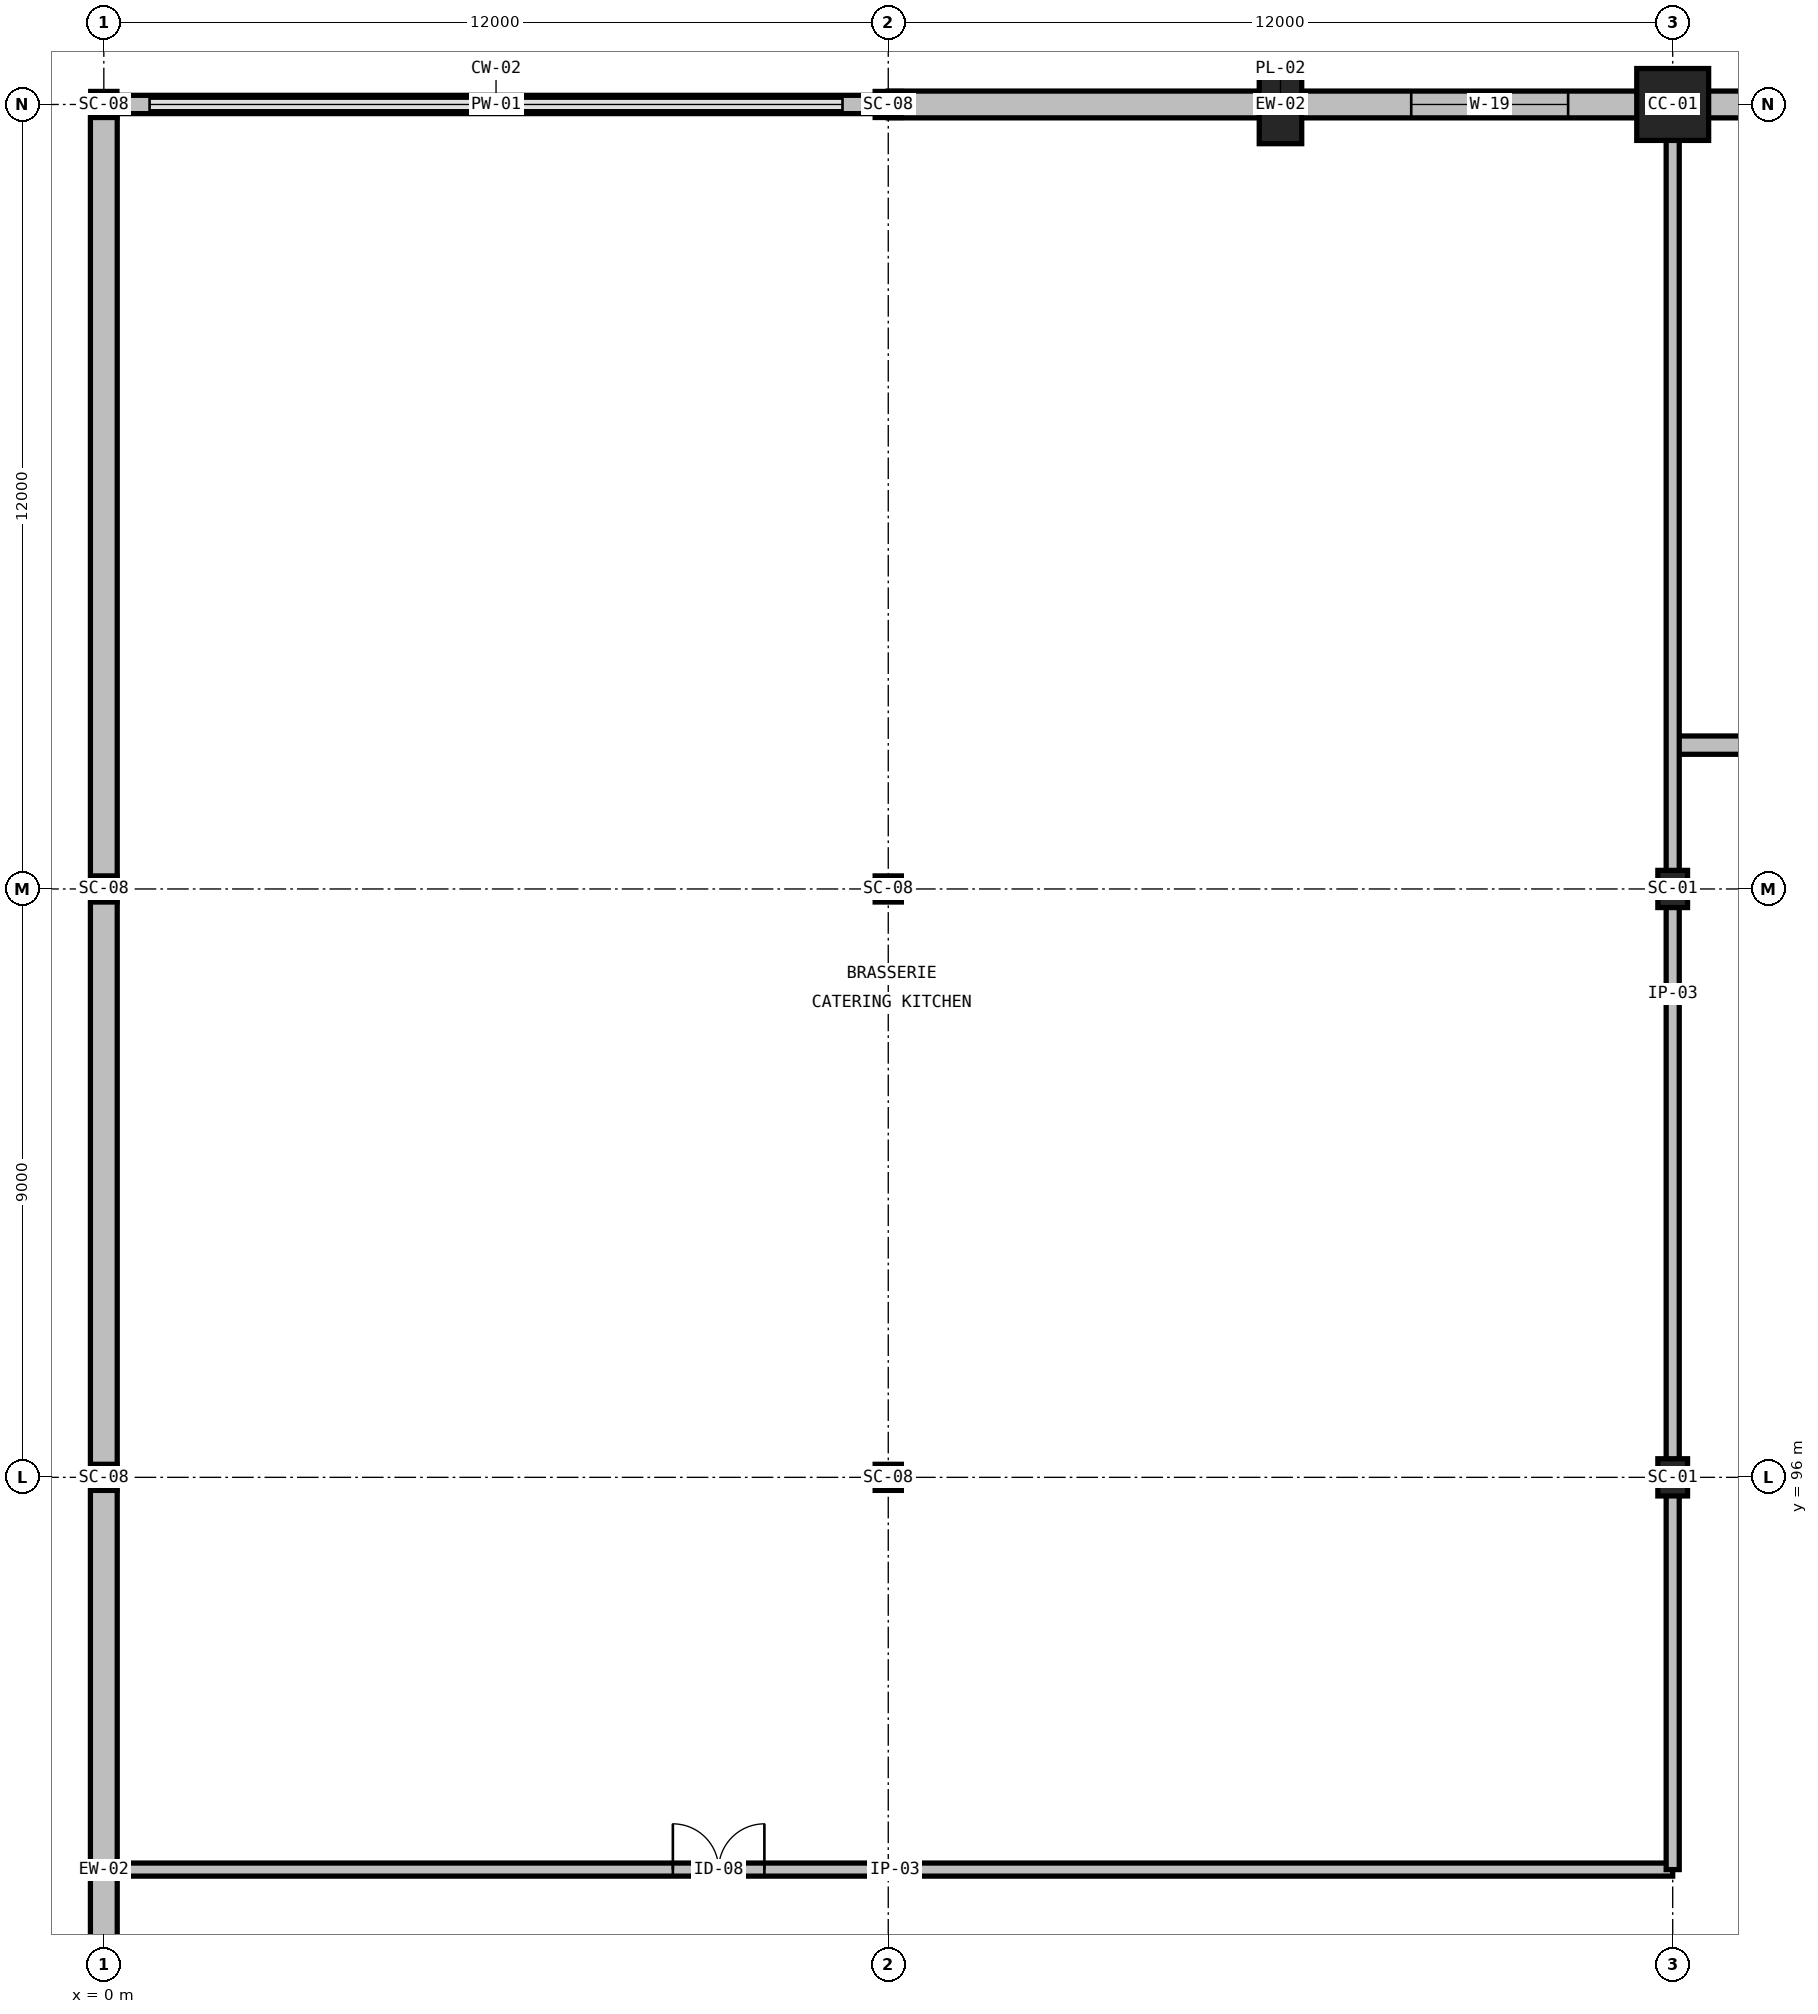
"""IFC4 building model, lengths in metres.
Left out: names, types, materials, properties, quantities, classifications, styles, units other than length and angle.
Written with IfcOpenShell. Run it as: python <this file> out.ifc"""

import sys

from ifc_helpers import new_model, si_unit, direction, frame, frame_2d, origin, origin_2d, place, context, subcontext, project, spatial, rectangle, i_section, extrude, element, fill, save


model = new_model("IFC4")
c1 = context("Model", 3, precision=1e-05, world=origin(), true_north=direction((0.0, 1.0)))
c2 = subcontext(c1, "Body", "Model", "MODEL_VIEW")
j1 = project(units=[si_unit("LENGTHUNIT", "METRE"), si_unit("PLANEANGLEUNIT", "RADIAN")], contexts=[c1])
p1 = place(None, origin())
s1 = spatial("IfcSite", under=j1, at=p1, CompositionType="ELEMENT")
p2 = place(p1, origin())
s2 = spatial("IfcBuilding", under=s1, at=p2, CompositionType="ELEMENT")
p3 = place(p2, frame((0.0, 0.0, 6.0)))
s3 = spatial("IfcBuildingStorey", under=s2, at=p3, CompositionType="ELEMENT", Elevation=6.0)
for number, where, z_axis, x_axis in (
    (1, (0.0, 96.0, 0.0), (0.0, 0.0, 1.0), (1.0, 0.0, 0.0)),
    (2, (0.0, 105.0, 0.0), (0.0, 0.0, 1.0), (1.0, 0.0, 0.0)),
    (3, (0.0, 117.0, 0.0), (0.0, 0.0, 1.0), (1.0, 0.0, 0.0)),
    (4, (12.0, 96.0, 0.0), (0.0, 0.0, 1.0), (1.0, 0.0, 0.0)),
    (5, (12.0, 105.0, 0.0), (0.0, 0.0, 1.0), (1.0, 0.0, 0.0)),
    (6, (12.0, 117.0, 0.0), (0.0, 0.0, 1.0), (1.0, 0.0, 0.0)),
):
    element("IfcColumn", number, at=place(p3, frame(where, z_axis=z_axis, x_axis=x_axis)), inside=s3, PredefinedType="COLUMN", context=c2, shape_type="SweptSolid", body=[
        extrude(i_section(OverallWidth=0.401, OverallDepth=0.399, WebThickness=0.025, FlangeThickness=0.04, FilletRadius=0.031, at=origin_2d()), origin(), (0.0, 0.0, 1.0), 6.0),
    ])
for number, where, z_axis, x_axis in (
    (7, (24.0, 96.0, 0.0), (0.0, 0.0, 1.0), (1.0, 0.0, 0.0)),
    (8, (24.0, 105.0, 0.0), (0.0, 0.0, 1.0), (1.0, 0.0, 0.0)),
):
    element("IfcColumn", number, at=place(p3, frame(where, z_axis=z_axis, x_axis=x_axis)), inside=s3, PredefinedType="COLUMN", context=c2, shape_type="SweptSolid", body=[
        extrude(i_section(OverallWidth=0.454, OverallDepth=0.569, WebThickness=0.078, FlangeThickness=0.125, FilletRadius=0.031, at=origin_2d()), origin(), (0.0, 0.0, 1.0), 6.0),
    ])
p4 = place(p3, frame((24.0, 117.0, 0.0), z_axis=(0.0, 0.0, 1.0), x_axis=(1.0, 0.0, 0.0)))
e9 = element("IfcColumn", 9, at=p4, inside=s3, PredefinedType="COLUMN", context=c2, shape_type="SweptSolid", body=[
    extrude(rectangle(XDim=1.1, YDim=1.1, at=origin_2d()), origin(), (0.0, 0.0, 1.0), 6.0),
])
p5 = place(p3, frame((18.0, 117.0, 0.0), z_axis=(0.0, 0.0, 1.0), x_axis=(1.0, 0.0, 0.0)))
e10 = element("IfcColumn", 10, at=p5, inside=s3, PredefinedType="PILASTER", context=c2, shape_type="SweptSolid", body=[
    extrude(rectangle(XDim=0.65, YDim=1.2, at=origin_2d()), origin(), (0.0, 0.0, 1.0), 6.0),
])
p6 = place(p3, frame((12.0, 117.0, 0.0), z_axis=(0.0, 0.0, 1.0), x_axis=(-1.0, 0.0, 0.0)))
e11 = element("IfcWall", 11, at=p6, inside=s3, PredefinedType="PARAPET", context=c2, shape_type="SweptSolid", body=[
    extrude(rectangle(XDim=12.0, YDim=0.28, at=frame_2d((6.0, 0.0))), origin(), (0.0, 0.0, 1.0), 0.2),
])
p7 = place(p3, frame((24.0, 117.0, 0.0), z_axis=(0.0, 0.0, 1.0), x_axis=(-1.0, 0.0, 0.0)))
e12 = element("IfcWall", 12, at=p7, inside=s3, PredefinedType="STANDARD", context=c2, shape_type="SweptSolid", body=[
    extrude(rectangle(XDim=12.0, YDim=0.41, at=frame_2d((6.0, 0.0))), origin(), (0.0, 0.0, 1.0), 4.676),
])
p8 = place(p7, frame((1.6, 0.0, 0.9)))
e13 = element("IfcOpeningElement", 13, at=p8, cuts=e12, PredefinedType="OPENING", context=c2, shape_type="SweptSolid", body=[
    extrude(rectangle(XDim=2.4, YDim=2.15, at=frame_2d((1.2, 1.075))), frame((0.0, 0.22, 0.0), z_axis=(0.0, -1.0, 0.0), x_axis=(1.0, 0.0, 0.0)), (0.0, 0.0, 1.0), 0.44),
])
p9 = place(p3, frame((30.0, 117.0, 0.0), z_axis=(0.0, 0.0, 1.0), x_axis=(-1.0, 0.0, 0.0)))
e14 = element("IfcWall", 14, at=p9, inside=s3, PredefinedType="STANDARD", context=c2, shape_type="SweptSolid", body=[
    extrude(rectangle(XDim=6.0, YDim=0.41, at=frame_2d((3.0, 0.0))), origin(), (0.0, 0.0, 1.0), 4.676),
])
p10 = place(p3, frame((0.0, 96.0, 0.0), z_axis=(0.0, 0.0, 1.0), x_axis=(0.0, -1.0, 0.0)))
e15 = element("IfcWall", 15, at=p10, inside=s3, PredefinedType="STANDARD", context=c2, shape_type="SweptSolid", body=[
    extrude(rectangle(XDim=12.0, YDim=0.41, at=frame_2d((6.0, 0.0))), origin(), (0.0, 0.0, 1.0), 5.269),
])
p11 = place(p3, frame((0.0, 105.0, 0.0), z_axis=(0.0, 0.0, 1.0), x_axis=(0.0, -1.0, 0.0)))
e16 = element("IfcWall", 16, at=p11, inside=s3, PredefinedType="STANDARD", context=c2, shape_type="SweptSolid", body=[
    extrude(rectangle(XDim=9.0, YDim=0.41, at=frame_2d((4.5, 0.0))), origin(), (0.0, 0.0, 1.0), 5.269),
])
p12 = place(p3, frame((0.0, 117.0, 0.0), z_axis=(0.0, 0.0, 1.0), x_axis=(0.0, -1.0, 0.0)))
e17 = element("IfcWall", 17, at=p12, inside=s3, PredefinedType="STANDARD", context=c2, shape_type="SweptSolid", body=[
    extrude(rectangle(XDim=12.0, YDim=0.41, at=frame_2d((6.0, 0.0))), origin(), (0.0, 0.0, 1.0), 5.269),
])
p13 = place(p3, frame((24.0, 107.2, 0.0), z_axis=(0.0, 0.0, 1.0), x_axis=(1.0, 0.0, 0.0)))
e18 = element("IfcWall", 18, at=p13, inside=s3, PredefinedType="PARTITIONING", context=c2, shape_type="SweptSolid", body=[
    extrude(rectangle(XDim=24.5, YDim=0.28, at=frame_2d((12.25, 0.0))), origin(), (0.0, 0.0, 1.0), 5.68),
])
p14 = place(p13, frame((8.5, 0.0, 0.0)))
e19 = element("IfcOpeningElement", 19, at=p14, cuts=e18, PredefinedType="OPENING", context=c2, shape_type="SweptSolid", body=[
    extrude(rectangle(XDim=1.8, YDim=2.3, at=frame_2d((0.9, 1.15))), frame((0.0, 0.155, 0.0), z_axis=(0.0, -1.0, 0.0), x_axis=(1.0, 0.0, 0.0)), (0.0, 0.0, 1.0), 0.31),
])
p15 = place(p3, frame((0.205, 90.0, 0.0), z_axis=(0.0, 0.0, 1.0), x_axis=(1.0, 0.0, 0.0)))
e20 = element("IfcWall", 20, at=p15, inside=s3, PredefinedType="PARTITIONING", context=c2, shape_type="SweptSolid", body=[
    extrude(rectangle(XDim=23.795, YDim=0.2, at=frame_2d((11.897, 0.0))), origin(), (0.0, 0.0, 1.0), 5.146),
])
p16 = place(p15, frame((8.5, 0.0, 0.0)))
e21 = element("IfcOpeningElement", 21, at=p16, cuts=e20, PredefinedType="OPENING", context=c2, shape_type="SweptSolid", body=[
    extrude(rectangle(XDim=1.4, YDim=2.2, at=frame_2d((0.7, 1.1))), frame((0.0, 0.115, 0.0), z_axis=(0.0, -1.0, 0.0), x_axis=(1.0, 0.0, 0.0)), (0.0, 0.0, 1.0), 0.23),
])
p17 = place(p3, frame((24.0, 90.0, 0.0), z_axis=(0.0, 0.0, 1.0), x_axis=(0.0, 1.0, 0.0)))
e22 = element("IfcWall", 22, at=p17, inside=s3, PredefinedType="PARTITIONING", context=c2, shape_type="SweptSolid", body=[
    extrude(rectangle(XDim=26.795, YDim=0.2, at=frame_2d((13.397, 0.0))), origin(), (0.0, 0.0, 1.0), 4.83),
])
p18 = place(p8, origin())
e23 = element("IfcWindow", 23, at=p18, inside=s3, PartitioningType="DOUBLE_PANEL_VERTICAL", PredefinedType="WINDOW", context=c2, shape_type="SweptSolid", body=[
    extrude(rectangle(XDim=2.4, YDim=2.15, at=frame_2d((1.2, 1.075))), frame((0.0, 0.03, 0.0), z_axis=(0.0, -1.0, 0.0), x_axis=(1.0, 0.0, 0.0)), (0.0, 0.0, 1.0), 0.06),
])
fill(e13, e23)
p19 = place(p16, origin())
e24 = element("IfcDoor", 24, at=p19, inside=s3, OperationType="DOUBLE_DOOR_SINGLE_SWING", PredefinedType="DOOR", context=c2, shape_type="SweptSolid", body=[
    extrude(rectangle(XDim=1.4, YDim=2.2, at=frame_2d((0.7, 1.1))), frame((0.0, 0.025, 0.0), z_axis=(0.0, -1.0, 0.0), x_axis=(1.0, 0.0, 0.0)), (0.0, 0.0, 1.0), 0.05),
])
fill(e21, e24)
save(model, sys.argv[1])
